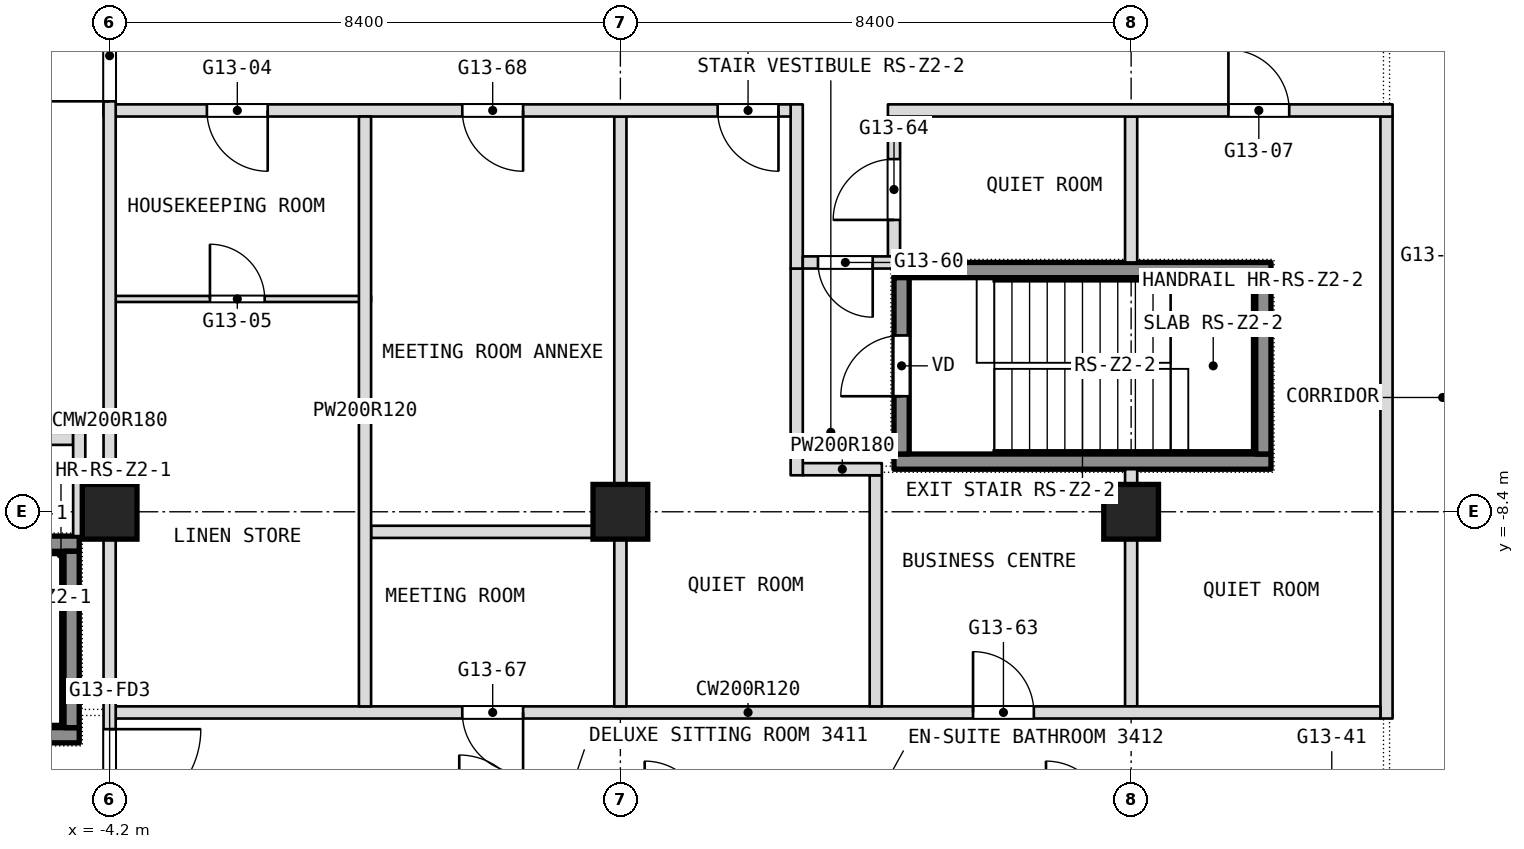
"""IFC4 building model, lengths in metres.
Left out: names, types, materials, properties, quantities, classifications, styles, units other than length and angle.
Written with IfcOpenShell. Run it as: python <this file> out.ifc"""

import sys

from ifc_helpers import new_model, si_unit, direction, frame, frame_2d, origin, origin_2d, place, context, subcontext, project, spatial, rectangle, extrude, element, fill, save


model = new_model("IFC4")
c1 = context("Model", 3, precision=1e-05, world=origin(), true_north=direction((0.0, 1.0)))
c2 = subcontext(c1, "Body", "Model", "MODEL_VIEW")
j1 = project(units=[si_unit("LENGTHUNIT", "METRE"), si_unit("PLANEANGLEUNIT", "RADIAN")], contexts=[c1])
p1 = place(None, origin())
s1 = spatial("IfcSite", under=j1, at=p1, CompositionType="ELEMENT")
p2 = place(p1, origin())
s2 = spatial("IfcBuilding", under=s1, at=p2, CompositionType="ELEMENT")
p3 = place(p2, frame((0.0, 0.0, 148.1)))
s3 = spatial("IfcBuildingStorey", under=s2, at=p3, CompositionType="ELEMENT", Elevation=148.1)
for number, where, z_axis, x_axis in (
    (1, (-4.2, -8.4, 0.0), (0.0, 0.0, 1.0), (1.0, 0.0, 0.0)),
    (2, (4.2, -8.4, 0.0), (0.0, 0.0, 1.0), (1.0, 0.0, 0.0)),
    (3, (12.6, -8.4, 0.0), (0.0, 0.0, 1.0), (1.0, 0.0, 0.0)),
):
    element("IfcColumn", number, at=place(p3, frame(where, z_axis=z_axis, x_axis=x_axis)), inside=s3, PredefinedType="COLUMN", context=c2, shape_type="SweptSolid", body=[
        extrude(rectangle(XDim=0.9, YDim=0.9, at=origin_2d()), origin(), (0.0, 0.0, 1.0), 3.6),
    ])
p4 = place(p3, frame((16.8, -11.8, 0.0), z_axis=(0.0, 0.0, 1.0), x_axis=(0.0, 1.0, 0.0)))
e4 = element("IfcWall", 4, at=p4, inside=s3, PredefinedType="PARTITIONING", context=c2, shape_type="SweptSolid", body=[
    extrude(rectangle(XDim=9.9, YDim=0.2, at=frame_2d((4.95, 0.0))), origin(), (0.0, 0.0, 1.0), 3.34),
])
p5 = place(p3, frame((12.6, -11.6, 0.0), z_axis=(0.0, 0.0, 1.0), x_axis=(0.0, 1.0, 0.0)))
e5 = element("IfcWall", 5, at=p5, inside=s3, PredefinedType="PARTITIONING", context=c2, shape_type="SweptSolid", body=[
    extrude(rectangle(XDim=3.9, YDim=0.2, at=frame_2d((1.95, 0.0))), origin(), (0.0, 0.0, 1.0), 3.34),
])
p6 = place(p3, frame((12.6, -4.3, 0.0), z_axis=(0.0, 0.0, 1.0), x_axis=(0.0, 1.0, 0.0)))
e6 = element("IfcWall", 6, at=p6, inside=s3, PredefinedType="PARTITIONING", context=c2, shape_type="SweptSolid", body=[
    extrude(rectangle(XDim=2.4, YDim=0.2, at=frame_2d((1.2, 0.0))), origin(), (0.0, 0.0, 1.0), 3.34),
])
p7 = place(p3, frame((-4.1, -11.7, 0.0), z_axis=(0.0, 0.0, 1.0), x_axis=(1.0, 0.0, 0.0)))
e7 = element("IfcWall", 7, at=p7, inside=s3, PredefinedType="PARTITIONING", context=c2, shape_type="SweptSolid", body=[
    extrude(rectangle(XDim=20.8, YDim=0.2, at=frame_2d((10.4, 0.0))), origin(), (0.0, 0.0, 1.0), 3.34),
])
p8 = place(p7, frame((14.1, 0.0, 0.0)))
e8 = element("IfcOpeningElement", 8, at=p8, cuts=e7, PredefinedType="OPENING", context=c2, shape_type="SweptSolid", body=[
    extrude(rectangle(XDim=1.0, YDim=2.1, at=frame_2d((0.5, 1.05))), frame((0.0, 0.1, 0.0), z_axis=(0.0, -1.0, 0.0), x_axis=(1.0, 0.0, 0.0)), (0.0, 0.0, 1.0), 0.2),
])
p9 = place(p7, frame((5.7, 0.0, 0.0)))
e9 = element("IfcOpeningElement", 9, at=p9, cuts=e7, PredefinedType="OPENING", context=c2, shape_type="SweptSolid", body=[
    extrude(rectangle(XDim=1.0, YDim=2.1, at=frame_2d((0.5, 1.05))), frame((0.0, 0.1, 0.0), z_axis=(0.0, -1.0, 0.0), x_axis=(1.0, 0.0, 0.0)), (0.0, 0.0, 1.0), 0.2),
])
p10 = place(p3, frame((0.1, -8.73, 0.0), z_axis=(0.0, 0.0, 1.0), x_axis=(1.0, 0.0, 0.0)))
e10 = element("IfcWall", 10, at=p10, inside=s3, PredefinedType="PARTITIONING", context=c2, shape_type="SweptSolid", body=[
    extrude(rectangle(XDim=4.0, YDim=0.2, at=frame_2d((2.0, 0.0))), origin(), (0.0, 0.0, 1.0), 3.34),
])
p11 = place(p3, frame((8.7, -4.3, 0.0), z_axis=(0.0, 0.0, 1.0), x_axis=(0.0, 1.0, 0.0)))
e11 = element("IfcWall", 11, at=p11, inside=s3, PredefinedType="PARTITIONING", context=c2, shape_type="SweptSolid", body=[
    extrude(rectangle(XDim=2.4, YDim=0.2, at=frame_2d((1.2, 0.0))), origin(), (0.0, 0.0, 1.0), 3.34),
])
p12 = place(p11, frame((0.7, 0.0, 0.0)))
e12 = element("IfcOpeningElement", 12, at=p12, cuts=e11, PredefinedType="OPENING", context=c2, shape_type="SweptSolid", body=[
    extrude(rectangle(XDim=1.0, YDim=2.1, at=frame_2d((0.5, 1.05))), frame((0.0, 0.1, 0.0), z_axis=(0.0, -1.0, 0.0), x_axis=(1.0, 0.0, 0.0)), (0.0, 0.0, 1.0), 0.2),
])
p13 = place(p3, frame((8.4, -11.6, 0.0), z_axis=(0.0, 0.0, 1.0), x_axis=(0.0, 1.0, 0.0)))
e13 = element("IfcWall", 13, at=p13, inside=s3, PredefinedType="PARTITIONING", context=c2, shape_type="SweptSolid", body=[
    extrude(rectangle(XDim=3.8, YDim=0.2, at=frame_2d((1.9, 0.0))), origin(), (0.0, 0.0, 1.0), 3.34),
])
p14 = place(p3, frame((7.2, -7.7, 0.0), z_axis=(0.0, 0.0, 1.0), x_axis=(1.0, 0.0, 0.0)))
e14 = element("IfcWall", 14, at=p14, inside=s3, PredefinedType="PARTITIONING", context=c2, shape_type="SweptSolid", body=[
    extrude(rectangle(XDim=1.3, YDim=0.2, at=frame_2d((0.65, 0.0))), origin(), (0.0, 0.0, 1.0), 3.34),
])
p15 = place(p3, frame((-8.5, -7.2, 0.0), z_axis=(0.0, 0.0, 1.0), x_axis=(1.0, 0.0, 0.0)))
e15 = element("IfcWall", 15, at=p15, inside=s3, PredefinedType="PARTITIONING", context=c2, shape_type="SweptSolid", body=[
    extrude(rectangle(XDim=3.7, YDim=0.2, at=frame_2d((1.85, 0.0))), origin(), (0.0, 0.0, 1.0), 3.34),
])
p16 = place(p15, frame((0.25, 0.0, 0.0)))
e16 = element("IfcOpeningElement", 16, at=p16, cuts=e15, PredefinedType="OPENING", context=c2, shape_type="SweptSolid", body=[
    extrude(rectangle(XDim=0.9, YDim=2.1, at=frame_2d((0.45, 1.05))), frame((0.0, 0.1, 0.0), z_axis=(0.0, -1.0, 0.0), x_axis=(1.0, 0.0, 0.0)), (0.0, 0.0, 1.0), 0.2),
])
p17 = place(p3, frame((7.1, -7.8, 0.0), z_axis=(0.0, 0.0, 1.0), x_axis=(0.0, 1.0, 0.0)))
e17 = element("IfcWall", 17, at=p17, inside=s3, PredefinedType="PARTITIONING", context=c2, shape_type="SweptSolid", body=[
    extrude(rectangle(XDim=3.4, YDim=0.2, at=frame_2d((1.7, 0.0))), origin(), (0.0, 0.0, 1.0), 3.34),
])
p18 = place(p3, frame((7.1, -4.4, 0.0), z_axis=(0.0, 0.0, 1.0), x_axis=(0.0, 1.0, 0.0)))
e18 = element("IfcWall", 18, at=p18, inside=s3, PredefinedType="PARTITIONING", context=c2, shape_type="SweptSolid", body=[
    extrude(rectangle(XDim=2.7, YDim=0.2, at=frame_2d((1.35, 0.0))), origin(), (0.0, 0.0, 1.0), 3.34),
])
p19 = place(p3, frame((-4.1, -4.9, 0.0), z_axis=(0.0, 0.0, 1.0), x_axis=(1.0, 0.0, 0.0)))
e19 = element("IfcWall", 19, at=p19, inside=s3, PredefinedType="PARTITIONING", context=c2, shape_type="SweptSolid", body=[
    extrude(rectangle(XDim=4.2, YDim=0.1, at=frame_2d((2.1, 0.0))), origin(), (0.0, 0.0, 1.0), 3.34),
])
p20 = place(p19, frame((1.55, 0.0, 0.0)))
e20 = element("IfcOpeningElement", 20, at=p20, cuts=e19, PredefinedType="OPENING", context=c2, shape_type="SweptSolid", body=[
    extrude(rectangle(XDim=0.9, YDim=2.1, at=frame_2d((0.45, 1.05))), frame((0.0, 0.05, 0.0), z_axis=(0.0, -1.0, 0.0), x_axis=(1.0, 0.0, 0.0)), (0.0, 0.0, 1.0), 0.1),
])
p21 = place(p3, frame((7.2, -4.3, 0.0), z_axis=(0.0, 0.0, 1.0), x_axis=(1.0, 0.0, 0.0)))
e21 = element("IfcWall", 21, at=p21, inside=s3, PredefinedType="PARTITIONING", context=c2, shape_type="SweptSolid", body=[
    extrude(rectangle(XDim=1.5, YDim=0.2, at=frame_2d((0.75, 0.0))), origin(), (0.0, 0.0, 1.0), 3.34),
])
p22 = place(p21, frame((0.25, 0.0, 0.0)))
e22 = element("IfcOpeningElement", 22, at=p22, cuts=e21, PredefinedType="OPENING", context=c2, shape_type="SweptSolid", body=[
    extrude(rectangle(XDim=0.9, YDim=2.1, at=frame_2d((0.45, 1.05))), frame((0.0, 0.1, 0.0), z_axis=(0.0, -1.0, 0.0), x_axis=(1.0, 0.0, 0.0)), (0.0, 0.0, 1.0), 0.2),
])
p23 = place(p3, frame((4.2, -11.6, 0.0), z_axis=(0.0, 0.0, 1.0), x_axis=(0.0, 1.0, 0.0)))
e23 = element("IfcWall", 23, at=p23, inside=s3, PredefinedType="PARTITIONING", context=c2, shape_type="SweptSolid", body=[
    extrude(rectangle(XDim=9.7, YDim=0.2, at=frame_2d((4.85, 0.0))), origin(), (0.0, 0.0, 1.0), 3.34),
])
p24 = place(p3, frame((-4.3, -1.8, 0.0), z_axis=(0.0, 0.0, 1.0), x_axis=(1.0, 0.0, 0.0)))
e24 = element("IfcWall", 24, at=p24, inside=s3, PredefinedType="PARTITIONING", context=c2, shape_type="SweptSolid", body=[
    extrude(rectangle(XDim=11.3, YDim=0.2, at=frame_2d((5.65, 0.0))), origin(), (0.0, 0.0, 1.0), 3.34),
])
p25 = place(p24, frame((1.7, 0.0, 0.0)))
e25 = element("IfcOpeningElement", 25, at=p25, cuts=e24, PredefinedType="OPENING", context=c2, shape_type="SweptSolid", body=[
    extrude(rectangle(XDim=1.0, YDim=2.1, at=frame_2d((0.5, 1.05))), frame((0.0, 0.1, 0.0), z_axis=(0.0, -1.0, 0.0), x_axis=(1.0, 0.0, 0.0)), (0.0, 0.0, 1.0), 0.2),
])
p26 = place(p24, frame((10.1, 0.0, 0.0)))
e26 = element("IfcOpeningElement", 26, at=p26, cuts=e24, PredefinedType="OPENING", context=c2, shape_type="SweptSolid", body=[
    extrude(rectangle(XDim=1.0, YDim=2.1, at=frame_2d((0.5, 1.05))), frame((0.0, 0.1, 0.0), z_axis=(0.0, -1.0, 0.0), x_axis=(1.0, 0.0, 0.0)), (0.0, 0.0, 1.0), 0.2),
])
p27 = place(p24, frame((5.9, 0.0, 0.0)))
e27 = element("IfcOpeningElement", 27, at=p27, cuts=e24, PredefinedType="OPENING", context=c2, shape_type="SweptSolid", body=[
    extrude(rectangle(XDim=1.0, YDim=2.1, at=frame_2d((0.5, 1.05))), frame((0.0, 0.1, 0.0), z_axis=(0.0, -1.0, 0.0), x_axis=(1.0, 0.0, 0.0)), (0.0, 0.0, 1.0), 0.2),
])
p28 = place(p3, frame((8.6, -1.8, 0.0), z_axis=(0.0, 0.0, 1.0), x_axis=(1.0, 0.0, 0.0)))
e28 = element("IfcWall", 28, at=p28, inside=s3, PredefinedType="PARTITIONING", context=c2, shape_type="SweptSolid", body=[
    extrude(rectangle(XDim=8.3, YDim=0.2, at=frame_2d((4.15, 0.0))), origin(), (0.0, 0.0, 1.0), 3.34),
])
p29 = place(p28, frame((5.6, 0.0, 0.0)))
e29 = element("IfcOpeningElement", 29, at=p29, cuts=e28, PredefinedType="OPENING", context=c2, shape_type="SweptSolid", body=[
    extrude(rectangle(XDim=1.0, YDim=2.1, at=frame_2d((0.5, 1.05))), frame((0.0, 0.1, 0.0), z_axis=(0.0, -1.0, 0.0), x_axis=(1.0, 0.0, 0.0)), (0.0, 0.0, 1.0), 0.2),
])
p30 = place(p3, frame((0.0, -11.6, 0.0), z_axis=(0.0, 0.0, 1.0), x_axis=(0.0, 1.0, 0.0)))
e30 = element("IfcWall", 30, at=p30, inside=s3, PredefinedType="PARTITIONING", context=c2, shape_type="SweptSolid", body=[
    extrude(rectangle(XDim=9.7, YDim=0.2, at=frame_2d((4.85, 0.0))), origin(), (0.0, 0.0, 1.0), 3.34),
])
p31 = place(p3, frame((-4.2, -13.8, 0.0), z_axis=(0.0, 0.0, 1.0), x_axis=(0.0, 1.0, 0.0)))
e31 = element("IfcWall", 31, at=p31, inside=s3, PredefinedType="PARTITIONING", context=c2, shape_type="SweptSolid", body=[
    extrude(rectangle(XDim=13.8, YDim=0.2, at=frame_2d((6.9, 0.0))), origin(), (0.0, 0.0, 1.0), 3.34),
])
p32 = place(p31, frame((12.15, 0.0, 0.0)))
e32 = element("IfcOpeningElement", 32, at=p32, cuts=e31, PredefinedType="OPENING", context=c2, shape_type="SweptSolid", body=[
    extrude(rectangle(XDim=1.5, YDim=2.1, at=frame_2d((0.75, 1.05))), frame((0.0, 0.1, 0.0), z_axis=(0.0, -1.0, 0.0), x_axis=(1.0, 0.0, 0.0)), (0.0, 0.0, 1.0), 0.2),
])
p33 = place(p31, frame((0.325, 0.0, 0.0)))
e33 = element("IfcOpeningElement", 33, at=p33, cuts=e31, PredefinedType="OPENING", context=c2, shape_type="SweptSolid", body=[
    extrude(rectangle(XDim=1.5, YDim=2.1, at=frame_2d((0.75, 1.05))), frame((0.0, 0.1, 0.0), z_axis=(0.0, -1.0, 0.0), x_axis=(1.0, 0.0, 0.0)), (0.0, 0.0, 1.0), 0.2),
])
p34 = place(p3, frame((-4.7, -8.8, 0.0), z_axis=(0.0, 0.0, 1.0), x_axis=(0.0, 1.0, 0.0)))
e34 = element("IfcWall", 34, at=p34, inside=s3, PredefinedType="PARTITIONING", context=c2, shape_type="SweptSolid", body=[
    extrude(rectangle(XDim=1.7, YDim=0.2, at=frame_2d((0.85, 0.0))), origin(), (0.0, 0.0, 1.0), 3.34),
])
p35 = place(p3, frame((-10.9, -12.075, 0.1), z_axis=(0.0, 0.0, 1.0), x_axis=(1.0, 0.0, 0.0)))
e35 = element("IfcWall", 35, at=p35, inside=s3, PredefinedType="SHEAR", context=c2, shape_type="SweptSolid", body=[
    extrude(rectangle(XDim=6.2, YDim=0.25, at=frame_2d((3.1, 0.0))), origin(), (0.0, 0.0, 1.0), 3.6),
])
p36 = place(p3, frame((-10.9, -8.925, 0.1), z_axis=(0.0, 0.0, 1.0), x_axis=(1.0, 0.0, 0.0)))
e36 = element("IfcWall", 36, at=p36, inside=s3, PredefinedType="SHEAR", context=c2, shape_type="SweptSolid", body=[
    extrude(rectangle(XDim=6.2, YDim=0.25, at=frame_2d((3.1, 0.0))), origin(), (0.0, 0.0, 1.0), 3.6),
])
p37 = place(p36, frame((0.45, 0.0, 0.0)))
e37 = element("IfcOpeningElement", 37, at=p37, cuts=e36, PredefinedType="OPENING", context=c2, shape_type="SweptSolid", body=[
    extrude(rectangle(XDim=1.0, YDim=2.1, at=frame_2d((0.5, 1.05))), frame((0.0, 0.125, 0.0), z_axis=(0.0, -1.0, 0.0), x_axis=(1.0, 0.0, 0.0)), (0.0, 0.0, 1.0), 0.25),
])
p38 = place(p3, frame((-4.825, -11.95, 0.1), z_axis=(0.0, 0.0, 1.0), x_axis=(0.0, 1.0, 0.0)))
e38 = element("IfcWall", 38, at=p38, inside=s3, PredefinedType="SHEAR", context=c2, shape_type="SweptSolid", body=[
    extrude(rectangle(XDim=2.9, YDim=0.25, at=frame_2d((1.45, 0.0))), origin(), (0.0, 0.0, 1.0), 3.6),
])
for number, where, z_axis, x_axis in (
    (39, (8.7, -7.575, 0.1), (0.0, 0.0, 1.0), (1.0, 0.0, 0.0)),
    (40, (8.7, -4.425, 0.1), (0.0, 0.0, 1.0), (1.0, 0.0, 0.0)),
):
    element("IfcWall", number, at=place(p3, frame(where, z_axis=z_axis, x_axis=x_axis)), inside=s3, PredefinedType="SHEAR", context=c2, shape_type="SweptSolid", body=[
        extrude(rectangle(XDim=6.2, YDim=0.25, at=frame_2d((3.1, 0.0))), origin(), (0.0, 0.0, 1.0), 3.6),
    ])
p39 = place(p3, frame((8.825, -7.45, 0.1), z_axis=(0.0, 0.0, 1.0), x_axis=(0.0, 1.0, 0.0)))
e41 = element("IfcWall", 41, at=p39, inside=s3, PredefinedType="SHEAR", context=c2, shape_type="SweptSolid", body=[
    extrude(rectangle(XDim=2.9, YDim=0.25, at=frame_2d((1.45, 0.0))), origin(), (0.0, 0.0, 1.0), 3.6),
])
p40 = place(p39, frame((0.95, 0.0, 0.0)))
e42 = element("IfcOpeningElement", 42, at=p40, cuts=e41, PredefinedType="OPENING", context=c2, shape_type="SweptSolid", body=[
    extrude(rectangle(XDim=1.0, YDim=2.1, at=frame_2d((0.5, 1.05))), frame((0.0, 0.125, 0.0), z_axis=(0.0, -1.0, 0.0), x_axis=(1.0, 0.0, 0.0)), (0.0, 0.0, 1.0), 0.25),
])
p41 = place(p3, frame((14.775, -7.45, 0.1), z_axis=(0.0, 0.0, 1.0), x_axis=(0.0, 1.0, 0.0)))
e43 = element("IfcWall", 43, at=p41, inside=s3, PredefinedType="SHEAR", context=c2, shape_type="SweptSolid", body=[
    extrude(rectangle(XDim=2.9, YDim=0.25, at=frame_2d((1.45, 0.0))), origin(), (0.0, 0.0, 1.0), 3.6),
])
p42 = place(p8, origin())
e44 = element("IfcDoor", 44, at=p42, inside=s3, OperationType="SINGLE_SWING_LEFT", PredefinedType="DOOR", context=c2, shape_type="SweptSolid", body=[
    extrude(rectangle(XDim=1.0, YDim=2.1, at=frame_2d((0.5, 1.05))), frame((0.0, 0.025, 0.0), z_axis=(0.0, -1.0, 0.0), x_axis=(1.0, 0.0, 0.0)), (0.0, 0.0, 1.0), 0.05),
])
fill(e8, e44)
p43 = place(p9, origin())
e45 = element("IfcDoor", 45, at=p43, inside=s3, OperationType="SINGLE_SWING_LEFT", PredefinedType="DOOR", context=c2, shape_type="SweptSolid", body=[
    extrude(rectangle(XDim=1.0, YDim=2.1, at=frame_2d((0.5, 1.05))), frame((0.0, 0.025, 0.0), z_axis=(0.0, -1.0, 0.0), x_axis=(1.0, 0.0, 0.0)), (0.0, 0.0, 1.0), 0.05),
])
fill(e9, e45)
p44 = place(p12, origin())
e46 = element("IfcDoor", 46, at=p44, inside=s3, OperationType="SINGLE_SWING_LEFT", PredefinedType="DOOR", context=c2, shape_type="SweptSolid", body=[
    extrude(rectangle(XDim=1.0, YDim=2.1, at=frame_2d((0.5, 1.05))), frame((0.0, 0.025, 0.0), z_axis=(0.0, -1.0, 0.0), x_axis=(1.0, 0.0, 0.0)), (0.0, 0.0, 1.0), 0.05),
])
fill(e12, e46)
p45 = place(p20, origin())
e47 = element("IfcDoor", 47, at=p45, inside=s3, OperationType="SINGLE_SWING_LEFT", PredefinedType="DOOR", context=c2, shape_type="SweptSolid", body=[
    extrude(rectangle(XDim=0.9, YDim=2.1, at=frame_2d((0.45, 1.05))), frame((0.0, 0.025, 0.0), z_axis=(0.0, -1.0, 0.0), x_axis=(1.0, 0.0, 0.0)), (0.0, 0.0, 1.0), 0.05),
])
fill(e20, e47)
p46 = place(p22, origin())
e48 = element("IfcDoor", 48, at=p46, inside=s3, OperationType="SINGLE_SWING_RIGHT", PredefinedType="DOOR", context=c2, shape_type="SweptSolid", body=[
    extrude(rectangle(XDim=0.9, YDim=2.1, at=frame_2d((0.45, 1.05))), frame((0.0, 0.025, 0.0), z_axis=(0.0, -1.0, 0.0), x_axis=(1.0, 0.0, 0.0)), (0.0, 0.0, 1.0), 0.05),
])
fill(e22, e48)
p47 = place(p25, origin())
e49 = element("IfcDoor", 49, at=p47, inside=s3, OperationType="SINGLE_SWING_RIGHT", PredefinedType="DOOR", context=c2, shape_type="SweptSolid", body=[
    extrude(rectangle(XDim=1.0, YDim=2.1, at=frame_2d((0.5, 1.05))), frame((0.0, 0.025, 0.0), z_axis=(0.0, -1.0, 0.0), x_axis=(1.0, 0.0, 0.0)), (0.0, 0.0, 1.0), 0.05),
])
fill(e25, e49)
p48 = place(p26, origin())
e50 = element("IfcDoor", 50, at=p48, inside=s3, OperationType="SINGLE_SWING_LEFT", PredefinedType="DOOR", context=c2, shape_type="SweptSolid", body=[
    extrude(rectangle(XDim=1.0, YDim=2.1, at=frame_2d((0.5, 1.05))), frame((0.0, 0.025, 0.0), z_axis=(0.0, -1.0, 0.0), x_axis=(1.0, 0.0, 0.0)), (0.0, 0.0, 1.0), 0.05),
])
fill(e26, e50)
p49 = place(p27, origin())
e51 = element("IfcDoor", 51, at=p49, inside=s3, OperationType="SINGLE_SWING_RIGHT", PredefinedType="DOOR", context=c2, shape_type="SweptSolid", body=[
    extrude(rectangle(XDim=1.0, YDim=2.1, at=frame_2d((0.5, 1.05))), frame((0.0, 0.025, 0.0), z_axis=(0.0, -1.0, 0.0), x_axis=(1.0, 0.0, 0.0)), (0.0, 0.0, 1.0), 0.05),
])
fill(e27, e51)
p50 = place(p29, origin())
e52 = element("IfcDoor", 52, at=p50, inside=s3, OperationType="SINGLE_SWING_LEFT", PredefinedType="DOOR", context=c2, shape_type="SweptSolid", body=[
    extrude(rectangle(XDim=1.0, YDim=2.1, at=frame_2d((0.5, 1.05))), frame((0.0, 0.025, 0.0), z_axis=(0.0, -1.0, 0.0), x_axis=(1.0, 0.0, 0.0)), (0.0, 0.0, 1.0), 0.05),
])
fill(e29, e52)
p51 = place(p40, origin())
e53 = element("IfcDoor", 53, at=p51, inside=s3, OperationType="SINGLE_SWING_LEFT", PredefinedType="DOOR", context=c2, shape_type="SweptSolid", body=[
    extrude(rectangle(XDim=1.0, YDim=2.1, at=frame_2d((0.5, 1.05))), frame((0.0, 0.025, 0.0), z_axis=(0.0, -1.0, 0.0), x_axis=(1.0, 0.0, 0.0)), (0.0, 0.0, 1.0), 0.05),
])
fill(e42, e53)
p52 = place(p32, origin())
e54 = element("IfcDoor", 54, at=p52, inside=s3, OperationType="DOUBLE_DOOR_DOUBLE_SWING", PredefinedType="DOOR", context=c2, shape_type="SweptSolid", body=[
    extrude(rectangle(XDim=1.5, YDim=2.1, at=frame_2d((0.75, 1.05))), frame((0.0, 0.025, 0.0), z_axis=(0.0, -1.0, 0.0), x_axis=(1.0, 0.0, 0.0)), (0.0, 0.0, 1.0), 0.05),
])
fill(e32, e54)
p53 = place(p33, origin())
e55 = element("IfcDoor", 55, at=p53, inside=s3, OperationType="DOUBLE_DOOR_DOUBLE_SWING", PredefinedType="DOOR", context=c2, shape_type="SweptSolid", body=[
    extrude(rectangle(XDim=1.5, YDim=2.1, at=frame_2d((0.75, 1.05))), frame((0.0, 0.025, 0.0), z_axis=(0.0, -1.0, 0.0), x_axis=(1.0, 0.0, 0.0)), (0.0, 0.0, 1.0), 0.05),
])
fill(e33, e55)
save(model, sys.argv[1])
